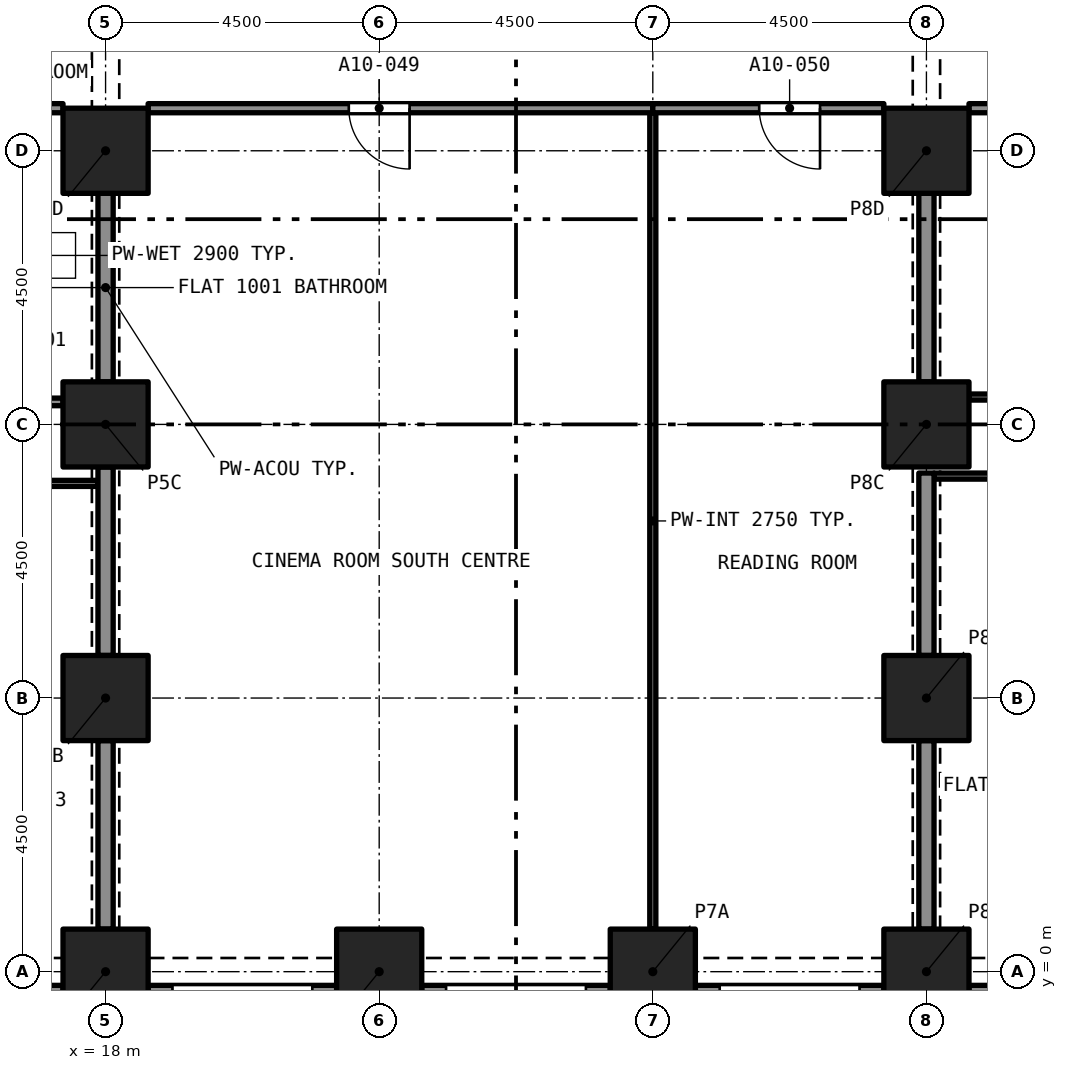
"""IFC4 building model, lengths in metres.
Left out: names, types, materials, properties, quantities, classifications, styles, units other than length and angle.
Written with IfcOpenShell. Run it as: python <this file> out.ifc"""

import sys

from ifc_helpers import new_model, si_unit, direction, frame, frame_2d, origin, origin_2d, place, context, subcontext, project, spatial, rectangle, extrude, element, fill, save


model = new_model("IFC4")
c1 = context("Model", 3, precision=1e-05, world=origin(), true_north=direction((0.0, 1.0)))
c2 = subcontext(c1, "Body", "Model", "MODEL_VIEW")
j1 = project(units=[si_unit("LENGTHUNIT", "METRE"), si_unit("PLANEANGLEUNIT", "RADIAN")], contexts=[c1])
p1 = place(None, origin())
s1 = spatial("IfcSite", under=j1, at=p1, CompositionType="ELEMENT")
p2 = place(p1, origin())
s2 = spatial("IfcBuilding", under=s1, at=p2, CompositionType="ELEMENT")
p3 = place(p2, frame((0.0, 0.0, 43.2)))
s3 = spatial("IfcBuildingStorey", under=s2, at=p3, CompositionType="ELEMENT", Elevation=43.2)
for number, where, z_axis, x_axis in (
    (1, (18.0, 0.0, 0.0), (0.0, 0.0, 1.0), (1.0, 0.0, 0.0)),
    (2, (22.5, 0.0, 0.0), (0.0, 0.0, 1.0), (1.0, 0.0, 0.0)),
    (3, (27.0, 0.0, 0.0), (0.0, 0.0, 1.0), (1.0, 0.0, 0.0)),
    (4, (31.5, 0.0, 0.0), (0.0, 0.0, 1.0), (1.0, 0.0, 0.0)),
    (5, (18.0, 4.5, 0.0), (0.0, 0.0, 1.0), (1.0, 0.0, 0.0)),
    (6, (31.5, 4.5, 0.0), (0.0, 0.0, 1.0), (1.0, 0.0, 0.0)),
    (7, (18.0, 9.0, 0.0), (0.0, 0.0, 1.0), (1.0, 0.0, 0.0)),
    (8, (31.5, 9.0, 0.0), (0.0, 0.0, 1.0), (1.0, 0.0, 0.0)),
    (9, (18.0, 13.5, 0.0), (0.0, 0.0, 1.0), (1.0, 0.0, 0.0)),
    (10, (31.5, 13.5, 0.0), (0.0, 0.0, 1.0), (1.0, 0.0, 0.0)),
):
    element("IfcColumn", number, at=place(p3, frame(where, z_axis=z_axis, x_axis=x_axis)), inside=s3, PredefinedType="COLUMN", context=c2, shape_type="SweptSolid", body=[
        extrude(rectangle(XDim=1.4, YDim=1.4, at=origin_2d()), origin(), (0.0, 0.0, 1.0), 3.2),
    ])
p4 = place(p3, frame((17.3, -0.375, 0.0), z_axis=(0.0, 0.0, 1.0), x_axis=(-1.0, 0.0, 0.0)))
e11 = element("IfcWall", 11, at=p4, inside=s3, PredefinedType="SOLIDWALL", context=c2, shape_type="SweptSolid", body=[
    extrude(rectangle(XDim=3.1, YDim=0.3, at=frame_2d((1.55, 0.0))), origin(), (0.0, 0.0, 1.0), 3.2),
])
p5 = place(p4, frame((0.4, 0.0, 0.45)))
e12 = element("IfcOpeningElement", 12, at=p5, cuts=e11, PredefinedType="OPENING", context=c2, shape_type="SweptSolid", body=[
    extrude(rectangle(XDim=2.3, YDim=1.95, at=frame_2d((1.15, 0.975))), frame((0.0, 0.16, 0.0), z_axis=(0.0, -1.0, 0.0), x_axis=(1.0, 0.0, 0.0)), (0.0, 0.0, 1.0), 0.32),
])
p6 = place(p3, frame((21.8, -0.375, 0.0), z_axis=(0.0, 0.0, 1.0), x_axis=(-1.0, 0.0, 0.0)))
e13 = element("IfcWall", 13, at=p6, inside=s3, PredefinedType="SOLIDWALL", context=c2, shape_type="SweptSolid", body=[
    extrude(rectangle(XDim=3.1, YDim=0.3, at=frame_2d((1.55, 0.0))), origin(), (0.0, 0.0, 1.0), 3.2),
])
p7 = place(p6, frame((0.4, 0.0, 0.45)))
e14 = element("IfcOpeningElement", 14, at=p7, cuts=e13, PredefinedType="OPENING", context=c2, shape_type="SweptSolid", body=[
    extrude(rectangle(XDim=2.3, YDim=1.95, at=frame_2d((1.15, 0.975))), frame((0.0, 0.16, 0.0), z_axis=(0.0, -1.0, 0.0), x_axis=(1.0, 0.0, 0.0)), (0.0, 0.0, 1.0), 0.32),
])
p8 = place(p3, frame((26.3, -0.375, 0.0), z_axis=(0.0, 0.0, 1.0), x_axis=(-1.0, 0.0, 0.0)))
e15 = element("IfcWall", 15, at=p8, inside=s3, PredefinedType="SOLIDWALL", context=c2, shape_type="SweptSolid", body=[
    extrude(rectangle(XDim=3.1, YDim=0.3, at=frame_2d((1.55, 0.0))), origin(), (0.0, 0.0, 1.0), 3.2),
])
p9 = place(p8, frame((0.4, 0.0, 0.45)))
e16 = element("IfcOpeningElement", 16, at=p9, cuts=e15, PredefinedType="OPENING", context=c2, shape_type="SweptSolid", body=[
    extrude(rectangle(XDim=2.3, YDim=1.95, at=frame_2d((1.15, 0.975))), frame((0.0, 0.16, 0.0), z_axis=(0.0, -1.0, 0.0), x_axis=(1.0, 0.0, 0.0)), (0.0, 0.0, 1.0), 0.32),
])
p10 = place(p3, frame((30.8, -0.375, 0.0), z_axis=(0.0, 0.0, 1.0), x_axis=(-1.0, 0.0, 0.0)))
e17 = element("IfcWall", 17, at=p10, inside=s3, PredefinedType="SOLIDWALL", context=c2, shape_type="SweptSolid", body=[
    extrude(rectangle(XDim=3.1, YDim=0.3, at=frame_2d((1.55, 0.0))), origin(), (0.0, 0.0, 1.0), 3.2),
])
p11 = place(p10, frame((0.4, 0.0, 0.45)))
e18 = element("IfcOpeningElement", 18, at=p11, cuts=e17, PredefinedType="OPENING", context=c2, shape_type="SweptSolid", body=[
    extrude(rectangle(XDim=2.3, YDim=1.95, at=frame_2d((1.15, 0.975))), frame((0.0, 0.16, 0.0), z_axis=(0.0, -1.0, 0.0), x_axis=(1.0, 0.0, 0.0)), (0.0, 0.0, 1.0), 0.32),
])
p12 = place(p3, frame((35.3, -0.375, 0.0), z_axis=(0.0, 0.0, 1.0), x_axis=(-1.0, 0.0, 0.0)))
e19 = element("IfcWall", 19, at=p12, inside=s3, PredefinedType="SOLIDWALL", context=c2, shape_type="SweptSolid", body=[
    extrude(rectangle(XDim=3.1, YDim=0.3, at=frame_2d((1.55, 0.0))), origin(), (0.0, 0.0, 1.0), 3.2),
])
p13 = place(p12, frame((0.4, 0.0, 0.45)))
e20 = element("IfcOpeningElement", 20, at=p13, cuts=e19, PredefinedType="OPENING", context=c2, shape_type="SweptSolid", body=[
    extrude(rectangle(XDim=2.3, YDim=1.95, at=frame_2d((1.15, 0.975))), frame((0.0, 0.16, 0.0), z_axis=(0.0, -1.0, 0.0), x_axis=(1.0, 0.0, 0.0)), (0.0, 0.0, 1.0), 0.32),
])
p14 = place(p3, frame((15.312, 9.37, 0.0), z_axis=(0.0, 0.0, 1.0), x_axis=(1.0, 0.0, 0.0)))
e21 = element("IfcWall", 21, at=p14, inside=s3, PredefinedType="PARTITIONING", context=c2, shape_type="SweptSolid", body=[
    extrude(rectangle(XDim=1.988, YDim=0.125, at=frame_2d((0.994, 0.0))), origin(), (0.0, 0.0, 1.0), 2.9),
])
p15 = place(p14, frame((0.975, 0.0, 0.0)))
e22 = element("IfcOpeningElement", 22, at=p15, cuts=e21, PredefinedType="OPENING", context=c2, shape_type="SweptSolid", body=[
    extrude(rectangle(XDim=0.8, YDim=2.1, at=frame_2d((0.4, 1.05))), frame((0.0, 0.073, 0.0), z_axis=(0.0, -1.0, 0.0), x_axis=(1.0, 0.0, 0.0)), (0.0, 0.0, 1.0), 0.145),
])
p16 = place(p3, frame((18.0, 9.7, 0.0), z_axis=(0.0, 0.0, 1.0), x_axis=(0.0, 1.0, 0.0)))
e23 = element("IfcWall", 23, at=p16, inside=s3, PredefinedType="PARTITIONING", context=c2, shape_type="SweptSolid", body=[
    extrude(rectangle(XDim=3.1, YDim=0.25, at=frame_2d((1.55, 0.0))), origin(), (0.0, 0.0, 1.0), 2.38),
])
p17 = place(p3, frame((15.375, 14.2, 0.0), z_axis=(0.0, 0.0, 1.0), x_axis=(1.0, 0.0, 0.0)))
e24 = element("IfcWall", 24, at=p17, inside=s3, PredefinedType="PARTITIONING", context=c2, shape_type="SweptSolid", body=[
    extrude(rectangle(XDim=1.925, YDim=0.15, at=frame_2d((0.962, 0.0))), origin(), (0.0, 0.0, 1.0), 2.9),
])
p18 = place(p3, frame((17.875, 8.03, 0.0), z_axis=(0.0, 0.0, 1.0), x_axis=(-1.0, 0.0, 0.0)))
e25 = element("IfcWall", 25, at=p18, inside=s3, PredefinedType="PARTITIONING", context=c2, shape_type="SweptSolid", body=[
    extrude(rectangle(XDim=4.375, YDim=0.1, at=frame_2d((2.188, 0.0))), origin(), (0.0, 0.0, 1.0), 2.9),
])
p19 = place(p18, frame((1.675, 0.0, 0.0)))
e26 = element("IfcOpeningElement", 26, at=p19, cuts=e25, PredefinedType="OPENING", context=c2, shape_type="SweptSolid", body=[
    extrude(rectangle(XDim=0.9, YDim=2.1, at=frame_2d((0.45, 1.05))), frame((0.0, 0.06, 0.0), z_axis=(0.0, -1.0, 0.0), x_axis=(1.0, 0.0, 0.0)), (0.0, 0.0, 1.0), 0.12),
])
for number, where, z_axis, x_axis in (
    (27, (18.0, 5.2, 0.0), (0.0, 0.0, 1.0), (0.0, 1.0, 0.0)),
    (28, (18.0, 0.7, 0.0), (0.0, 0.0, 1.0), (0.0, 1.0, 0.0)),
):
    element("IfcWall", number, at=place(p3, frame(where, z_axis=z_axis, x_axis=x_axis)), inside=s3, PredefinedType="PARTITIONING", context=c2, shape_type="SweptSolid", body=[
        extrude(rectangle(XDim=3.1, YDim=0.25, at=frame_2d((1.55, 0.0))), origin(), (0.0, 0.0, 1.0), 2.38),
    ])
p20 = place(p3, frame((32.2, 9.45, 0.0), z_axis=(0.0, 0.0, 1.0), x_axis=(1.0, 0.0, 0.0)))
e29 = element("IfcWall", 29, at=p20, inside=s3, PredefinedType="PARTITIONING", context=c2, shape_type="SweptSolid", body=[
    extrude(rectangle(XDim=2.815, YDim=0.1, at=frame_2d((1.408, 0.0))), origin(), (0.0, 0.0, 1.0), 2.9),
])
p21 = place(p20, frame((0.608, 0.0, 0.0)))
e30 = element("IfcOpeningElement", 30, at=p21, cuts=e29, PredefinedType="OPENING", context=c2, shape_type="SweptSolid", body=[
    extrude(rectangle(XDim=0.9, YDim=2.1, at=frame_2d((0.45, 1.05))), frame((0.0, 0.06, 0.0), z_axis=(0.0, -1.0, 0.0), x_axis=(1.0, 0.0, 0.0)), (0.0, 0.0, 1.0), 0.12),
])
p22 = place(p3, frame((36.0, 8.15, 0.0), z_axis=(0.0, 0.0, 1.0), x_axis=(-1.0, 0.0, 0.0)))
e31 = element("IfcWall", 31, at=p22, inside=s3, PredefinedType="PARTITIONING", context=c2, shape_type="SweptSolid", body=[
    extrude(rectangle(XDim=4.375, YDim=0.1, at=frame_2d((2.188, 0.0))), origin(), (0.0, 0.0, 1.0), 2.9),
])
p23 = place(p22, frame((1.75, 0.0, 0.0)))
e32 = element("IfcOpeningElement", 32, at=p23, cuts=e31, PredefinedType="OPENING", context=c2, shape_type="SweptSolid", body=[
    extrude(rectangle(XDim=1.0, YDim=2.1, at=frame_2d((0.5, 1.05))), frame((0.0, 0.06, 0.0), z_axis=(0.0, -1.0, 0.0), x_axis=(1.0, 0.0, 0.0)), (0.0, 0.0, 1.0), 0.12),
])
p24 = place(p3, frame((31.5, 9.7, 0.0), z_axis=(0.0, 0.0, 1.0), x_axis=(0.0, 1.0, 0.0)))
e33 = element("IfcWall", 33, at=p24, inside=s3, PredefinedType="PARTITIONING", context=c2, shape_type="SweptSolid", body=[
    extrude(rectangle(XDim=3.1, YDim=0.25, at=frame_2d((1.55, 0.0))), origin(), (0.0, 0.0, 1.0), 2.38),
])
p25 = place(p3, frame((32.2, 14.2, 0.0), z_axis=(0.0, 0.0, 1.0), x_axis=(1.0, 0.0, 0.0)))
e34 = element("IfcWall", 34, at=p25, inside=s3, PredefinedType="PARTITIONING", context=c2, shape_type="SweptSolid", body=[
    extrude(rectangle(XDim=5.3, YDim=0.15, at=frame_2d((2.65, 0.0))), origin(), (0.0, 0.0, 1.0), 2.9),
])
p26 = place(p3, frame((31.5, 0.7, 0.0), z_axis=(0.0, 0.0, 1.0), x_axis=(0.0, 1.0, 0.0)))
e35 = element("IfcWall", 35, at=p26, inside=s3, PredefinedType="PARTITIONING", context=c2, shape_type="SweptSolid", body=[
    extrude(rectangle(XDim=3.1, YDim=0.25, at=frame_2d((1.55, 0.0))), origin(), (0.0, 0.0, 1.0), 2.38),
])
p27 = place(p3, frame((31.5, 5.2, 0.0), z_axis=(0.0, 0.0, 1.0), x_axis=(0.0, 1.0, 0.0)))
e36 = element("IfcWall", 36, at=p27, inside=s3, PredefinedType="PARTITIONING", context=c2, shape_type="SweptSolid", body=[
    extrude(rectangle(XDim=3.0, YDim=0.25, at=frame_2d((1.5, 0.0))), origin(), (0.0, 0.0, 1.0), 2.38),
])
p28 = place(p3, frame((27.0, 0.7, 0.0), z_axis=(0.0, 0.0, 1.0), x_axis=(0.0, 1.0, 0.0)))
e37 = element("IfcWall", 37, at=p28, inside=s3, PredefinedType="PARTITIONING", context=c2, shape_type="SweptSolid", body=[
    extrude(rectangle(XDim=13.425, YDim=0.1, at=frame_2d((6.712, 0.0))), origin(), (0.0, 0.0, 1.0), 2.75),
])
p29 = place(p3, frame((27.0, 14.2, 0.0), z_axis=(0.0, 0.0, 1.0), x_axis=(-1.0, 0.0, 0.0)))
e38 = element("IfcWall", 38, at=p29, inside=s3, PredefinedType="PARTITIONING", context=c2, shape_type="SweptSolid", body=[
    extrude(rectangle(XDim=8.3, YDim=0.15, at=frame_2d((4.15, 0.0))), origin(), (0.0, 0.0, 1.0), 2.75),
])
p30 = place(p29, frame((4.0, 0.0, 0.0)))
e39 = element("IfcOpeningElement", 39, at=p30, cuts=e38, PredefinedType="OPENING", context=c2, shape_type="SweptSolid", body=[
    extrude(rectangle(XDim=1.0, YDim=2.1, at=frame_2d((0.5, 1.05))), frame((0.0, 0.085, 0.0), z_axis=(0.0, -1.0, 0.0), x_axis=(1.0, 0.0, 0.0)), (0.0, 0.0, 1.0), 0.17),
])
p31 = place(p3, frame((30.8, 14.2, 0.0), z_axis=(0.0, 0.0, 1.0), x_axis=(-1.0, 0.0, 0.0)))
e40 = element("IfcWall", 40, at=p31, inside=s3, PredefinedType="PARTITIONING", context=c2, shape_type="SweptSolid", body=[
    extrude(rectangle(XDim=3.8, YDim=0.15, at=frame_2d((1.9, 0.0))), origin(), (0.0, 0.0, 1.0), 2.75),
])
p32 = place(p31, frame((1.05, 0.0, 0.0)))
e41 = element("IfcOpeningElement", 41, at=p32, cuts=e40, PredefinedType="OPENING", context=c2, shape_type="SweptSolid", body=[
    extrude(rectangle(XDim=1.0, YDim=2.1, at=frame_2d((0.5, 1.05))), frame((0.0, 0.085, 0.0), z_axis=(0.0, -1.0, 0.0), x_axis=(1.0, 0.0, 0.0)), (0.0, 0.0, 1.0), 0.17),
])
p33 = place(p30, origin())
e42 = element("IfcDoor", 42, at=p33, inside=s3, OperationType="SINGLE_SWING_RIGHT", PredefinedType="DOOR", context=c2, shape_type="SweptSolid", body=[
    extrude(rectangle(XDim=1.0, YDim=2.1, at=frame_2d((0.5, 1.05))), frame((0.0, 0.025, 0.0), z_axis=(0.0, -1.0, 0.0), x_axis=(1.0, 0.0, 0.0)), (0.0, 0.0, 1.0), 0.05),
])
fill(e39, e42)
p34 = place(p32, origin())
e43 = element("IfcDoor", 43, at=p34, inside=s3, OperationType="SINGLE_SWING_LEFT", PredefinedType="DOOR", context=c2, shape_type="SweptSolid", body=[
    extrude(rectangle(XDim=1.0, YDim=2.1, at=frame_2d((0.5, 1.05))), frame((0.0, 0.025, 0.0), z_axis=(0.0, -1.0, 0.0), x_axis=(1.0, 0.0, 0.0)), (0.0, 0.0, 1.0), 0.05),
])
fill(e41, e43)
save(model, sys.argv[1])
